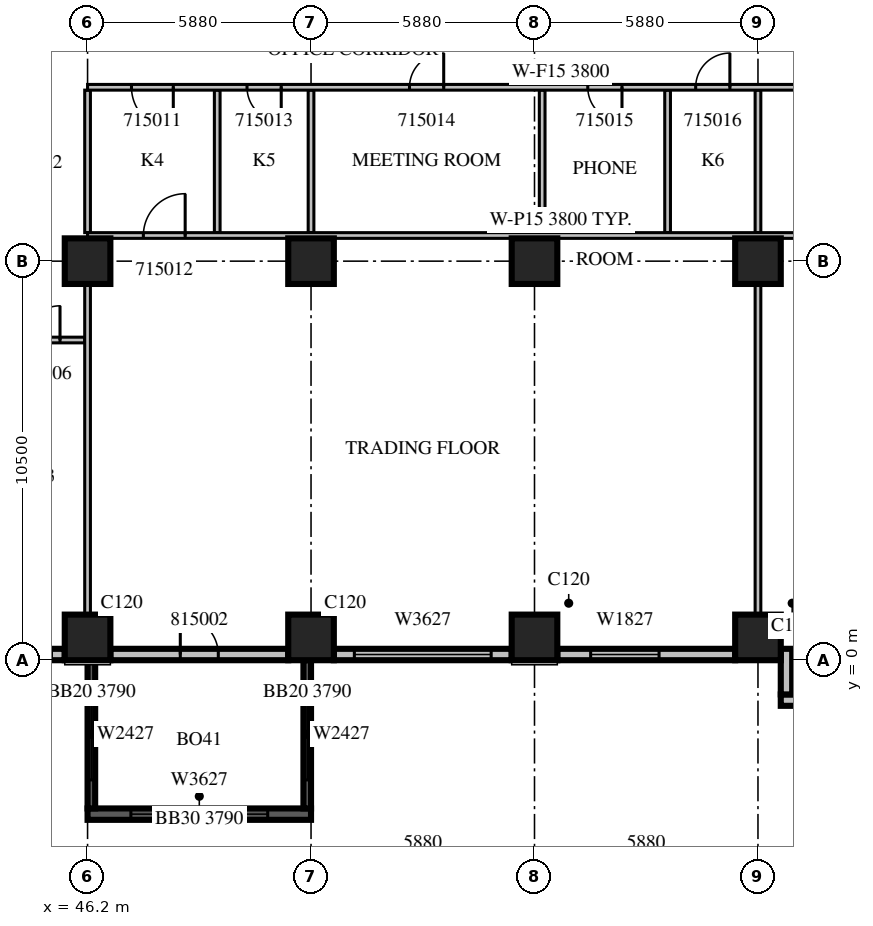
"""IFC4 building model, lengths in metres.
Left out: names, types, materials, properties, quantities, classifications, styles, units other than length and angle.
Written with IfcOpenShell. Run it as: python <this file> out.ifc"""

import sys

from ifc_helpers import new_model, si_unit, direction, frame, frame_2d, origin, origin_2d, place, context, subcontext, project, spatial, rectangle, extrude, source, transform, mapped, element, fill, save


model = new_model("IFC4")
c1 = context("Model", 3, precision=1e-05, world=origin(), true_north=direction((0.0, 1.0)))
c2 = subcontext(c1, "Body", "Model", "MODEL_VIEW")
j1 = project(units=[si_unit("LENGTHUNIT", "METRE"), si_unit("PLANEANGLEUNIT", "RADIAN")], contexts=[c1])
p1 = place(None, origin())
s1 = spatial("IfcSite", under=j1, at=p1, CompositionType="ELEMENT")
p2 = place(p1, origin())
s2 = spatial("IfcBuilding", under=s1, at=p2, CompositionType="ELEMENT")
p3 = place(p2, frame((0.0, 0.0, 74.1)))
s3 = spatial("IfcBuildingStorey", under=s2, at=p3, CompositionType="ELEMENT", Elevation=74.1)
m1 = source(origin(), c2, "Body", "SweptSolid", [
    extrude(rectangle(XDim=1.2, YDim=1.2, at=origin_2d()), origin(), (0.0, 0.0, 1.0), 4.2),
])
for number, where, z_axis, x_axis in (
    (1, (46.2, 0.6, 0.0), (0.0, 0.0, 1.0), (1.0, 0.0, 0.0)),
    (2, (52.08, 0.6, 0.0), (0.0, 0.0, 1.0), (1.0, 0.0, 0.0)),
    (3, (57.96, 0.6, 0.0), (0.0, 0.0, 1.0), (1.0, 0.0, 0.0)),
    (4, (63.84, 0.6, 0.0), (0.0, 0.0, 1.0), (1.0, 0.0, 0.0)),
    (5, (46.2, 10.5, 0.0), (0.0, 0.0, 1.0), (1.0, 0.0, 0.0)),
    (6, (52.08, 10.5, 0.0), (0.0, 0.0, 1.0), (1.0, 0.0, 0.0)),
    (7, (57.96, 10.5, 0.0), (0.0, 0.0, 1.0), (1.0, 0.0, 0.0)),
    (8, (63.84, 10.5, 0.0), (0.0, 0.0, 1.0), (1.0, 0.0, 0.0)),
):
    element("IfcColumn", number, at=place(p3, frame(where, z_axis=z_axis, x_axis=x_axis)), inside=s3, PredefinedType="COLUMN", context=c2, shape_type="MappedRepresentation", body=[
        mapped(m1, transform((0.0, 0.0, 0.0), scale=1.0)),
    ])
m2 = source(origin(), c2, "Body", "SweptSolid", [
    extrude(rectangle(XDim=1.6, YDim=0.3, at=frame_2d((0.8, 0.0))), origin(), (0.0, 0.0, 1.0), 3.8),
])
p4 = place(p3, frame((44.0, 0.15, 0.0), z_axis=(0.0, 0.0, 1.0), x_axis=(1.0, 0.0, 0.0)))
e9 = element("IfcWall", 9, at=p4, inside=s3, PredefinedType="STANDARD", context=c2, shape_type="MappedRepresentation", body=[
    mapped(m2, transform((0.0, 0.0, 0.0), scale=1.0)),
])
m3 = source(origin(), c2, "Body", "SweptSolid", [
    extrude(rectangle(XDim=0.9, YDim=2.7, at=frame_2d((0.45, 1.35))), frame((0.0, 0.16, 0.0), z_axis=(0.0, -1.0, 0.0), x_axis=(1.0, 0.0, 0.0)), (0.0, 0.0, 1.0), 0.32),
])
p5 = place(p4, frame((0.35, 0.0, 0.6)))
e10 = element("IfcOpeningElement", 10, at=p5, cuts=e9, PredefinedType="OPENING", context=c2, shape_type="MappedRepresentation", body=[
    mapped(m3, transform((0.0, 0.0, 0.0), scale=1.0)),
])
m4 = source(origin(), c2, "Body", "SweptSolid", [
    extrude(rectangle(XDim=4.68, YDim=0.3, at=frame_2d((2.34, 0.0))), origin(), (0.0, 0.0, 1.0), 3.8),
])
p6 = place(p3, frame((46.8, 0.15, 0.0), z_axis=(0.0, 0.0, 1.0), x_axis=(1.0, 0.0, 0.0)))
e11 = element("IfcWall", 11, at=p6, inside=s3, PredefinedType="STANDARD", context=c2, shape_type="MappedRepresentation", body=[
    mapped(m4, transform((0.0, 0.0, 0.0), scale=1.0)),
])
m5 = source(origin(), c2, "Body", "SweptSolid", [
    extrude(rectangle(XDim=1.0, YDim=2.1, at=frame_2d((0.5, 1.05))), frame((0.0, 0.16, 0.0), z_axis=(0.0, -1.0, 0.0), x_axis=(1.0, 0.0, 0.0)), (0.0, 0.0, 1.0), 0.32),
])
p7 = place(p6, frame((1.84, 0.0, 0.0)))
e12 = element("IfcOpeningElement", 12, at=p7, cuts=e11, PredefinedType="OPENING", context=c2, shape_type="MappedRepresentation", body=[
    mapped(m5, transform((0.0, 0.0, 0.0), scale=1.0)),
])
p8 = place(p3, frame((52.68, 0.15, 0.0), z_axis=(0.0, 0.0, 1.0), x_axis=(1.0, 0.0, 0.0)))
e13 = element("IfcWall", 13, at=p8, inside=s3, PredefinedType="STANDARD", context=c2, shape_type="MappedRepresentation", body=[
    mapped(m4, transform((0.0, 0.0, 0.0), scale=1.0)),
])
m6 = source(origin(), c2, "Body", "SweptSolid", [
    extrude(rectangle(XDim=3.6, YDim=2.7, at=frame_2d((1.8, 1.35))), frame((0.0, 0.16, 0.0), z_axis=(0.0, -1.0, 0.0), x_axis=(1.0, 0.0, 0.0)), (0.0, 0.0, 1.0), 0.32),
])
p9 = place(p8, frame((0.54, 0.0, 0.6)))
e14 = element("IfcOpeningElement", 14, at=p9, cuts=e13, PredefinedType="OPENING", context=c2, shape_type="MappedRepresentation", body=[
    mapped(m6, transform((0.0, 0.0, 0.0), scale=1.0)),
])
p10 = place(p3, frame((58.56, 0.15, 0.0), z_axis=(0.0, 0.0, 1.0), x_axis=(1.0, 0.0, 0.0)))
e15 = element("IfcWall", 15, at=p10, inside=s3, PredefinedType="STANDARD", context=c2, shape_type="MappedRepresentation", body=[
    mapped(m4, transform((0.0, 0.0, 0.0), scale=1.0)),
])
m7 = source(origin(), c2, "Body", "SweptSolid", [
    extrude(rectangle(XDim=1.8, YDim=2.7, at=frame_2d((0.9, 1.35))), frame((0.0, 0.16, 0.0), z_axis=(0.0, -1.0, 0.0), x_axis=(1.0, 0.0, 0.0)), (0.0, 0.0, 1.0), 0.32),
])
p11 = place(p10, frame((0.877, 0.0, 0.6)))
e16 = element("IfcOpeningElement", 16, at=p11, cuts=e15, PredefinedType="OPENING", context=c2, shape_type="MappedRepresentation", body=[
    mapped(m7, transform((0.0, 0.0, 0.0), scale=1.0)),
])
m8 = source(origin(), c2, "Body", "SweptSolid", [
    extrude(rectangle(XDim=2.76, YDim=0.3, at=frame_2d((1.38, 0.0))), origin(), (0.0, 0.0, 1.0), 3.8),
])
p12 = place(p3, frame((64.44, -1.05, 0.0), z_axis=(0.0, 0.0, 1.0), x_axis=(1.0, 0.0, 0.0)))
e17 = element("IfcWall", 17, at=p12, inside=s3, PredefinedType="STANDARD", context=c2, shape_type="MappedRepresentation", body=[
    mapped(m8, transform((0.0, 0.0, 0.0), scale=1.0)),
])
p13 = place(p12, frame((0.58, 0.0, 0.6)))
e18 = element("IfcOpeningElement", 18, at=p13, cuts=e17, PredefinedType="OPENING", context=c2, shape_type="MappedRepresentation", body=[
    mapped(m7, transform((0.0, 0.0, 0.0), scale=1.0)),
])
m9 = source(origin(), c2, "Body", "SweptSolid", [
    extrude(rectangle(XDim=1.2, YDim=0.3, at=frame_2d((0.6, 0.0))), origin(), (0.0, 0.0, 1.0), 3.8),
])
p14 = place(p3, frame((64.59, 0.3, 0.0), z_axis=(0.0, 0.0, 1.0), x_axis=(0.0, -1.0, 0.0)))
e19 = element("IfcWall", 19, at=p14, inside=s3, PredefinedType="STANDARD", context=c2, shape_type="MappedRepresentation", body=[
    mapped(m9, transform((0.0, 0.0, 0.0), scale=1.0)),
])
m10 = source(origin(), c2, "Body", "SweptSolid", [
    extrude(rectangle(XDim=5.88, YDim=0.3, at=frame_2d((2.94, 0.0))), origin(), (0.0, 0.0, 1.0), 3.79),
])
p15 = place(p3, frame((46.2, -4.05, 0.0), z_axis=(0.0, 0.0, 1.0), x_axis=(1.0, 0.0, 0.0)))
e20 = element("IfcWall", 20, at=p15, inside=s3, PredefinedType="SOLIDWALL", context=c2, shape_type="MappedRepresentation", body=[
    mapped(m10, transform((0.0, 0.0, 0.0), scale=1.0)),
])
p16 = place(p15, frame((1.14, 0.0, 0.6)))
e21 = element("IfcOpeningElement", 21, at=p16, cuts=e20, PredefinedType="OPENING", context=c2, shape_type="MappedRepresentation", body=[
    mapped(m6, transform((0.0, 0.0, 0.0), scale=1.0)),
])
m11 = source(origin(), c2, "Body", "SweptSolid", [
    extrude(rectangle(XDim=3.9, YDim=0.2, at=frame_2d((1.95, 0.0))), origin(), (0.0, 0.0, 1.0), 3.79),
])
p17 = place(p3, frame((46.3, 0.0, 0.0), z_axis=(0.0, 0.0, 1.0), x_axis=(0.0, -1.0, 0.0)))
e22 = element("IfcWall", 22, at=p17, inside=s3, PredefinedType="SOLIDWALL", context=c2, shape_type="MappedRepresentation", body=[
    mapped(m11, transform((0.0, 0.0, 0.0), scale=1.0)),
])
m12 = source(origin(), c2, "Body", "SweptSolid", [
    extrude(rectangle(XDim=2.4, YDim=2.7, at=frame_2d((1.2, 1.35))), frame((0.0, 0.11, 0.0), z_axis=(0.0, -1.0, 0.0), x_axis=(1.0, 0.0, 0.0)), (0.0, 0.0, 1.0), 0.22),
])
p18 = place(p17, frame((0.75, 0.0, 0.6)))
e23 = element("IfcOpeningElement", 23, at=p18, cuts=e22, PredefinedType="OPENING", context=c2, shape_type="MappedRepresentation", body=[
    mapped(m12, transform((0.0, 0.0, 0.0), scale=1.0)),
])
p19 = place(p3, frame((51.98, 0.0, 0.0), z_axis=(0.0, 0.0, 1.0), x_axis=(0.0, -1.0, 0.0)))
e24 = element("IfcWall", 24, at=p19, inside=s3, PredefinedType="SOLIDWALL", context=c2, shape_type="MappedRepresentation", body=[
    mapped(m11, transform((0.0, 0.0, 0.0), scale=1.0)),
])
p20 = place(p19, frame((0.75, 0.0, 0.6)))
e25 = element("IfcOpeningElement", 25, at=p20, cuts=e24, PredefinedType="OPENING", context=c2, shape_type="MappedRepresentation", body=[
    mapped(m12, transform((0.0, 0.0, 0.0), scale=1.0)),
])
m13 = source(origin(), c2, "Body", "SweptSolid", [
    extrude(rectangle(XDim=2.2, YDim=0.15, at=frame_2d((1.1, 0.0))), origin(), (0.0, 0.0, 1.0), 3.8),
])
p21 = place(p3, frame((46.125, 8.425, 0.0), z_axis=(0.0, 0.0, 1.0), x_axis=(-1.0, 0.0, 0.0)))
e26 = element("IfcWall", 26, at=p21, inside=s3, PredefinedType="PARTITIONING", context=c2, shape_type="MappedRepresentation", body=[
    mapped(m13, transform((0.0, 0.0, 0.0), scale=1.0)),
])
m14 = source(origin(), c2, "Body", "SweptSolid", [
    extrude(rectangle(XDim=0.9, YDim=2.1, at=frame_2d((0.45, 1.05))), frame((0.0, 0.085, 0.0), z_axis=(0.0, -1.0, 0.0), x_axis=(1.0, 0.0, 0.0)), (0.0, 0.0, 1.0), 0.17),
])
p22 = place(p21, frame((0.65, 0.0, 0.0)))
e27 = element("IfcOpeningElement", 27, at=p22, cuts=e26, PredefinedType="OPENING", context=c2, shape_type="MappedRepresentation", body=[
    mapped(m14, transform((0.0, 0.0, 0.0), scale=1.0)),
])
m15 = source(origin(), c2, "Body", "SweptSolid", [
    extrude(rectangle(XDim=3.75, YDim=0.15, at=frame_2d((1.875, 0.0))), origin(), (0.0, 0.0, 1.0), 3.8),
])
for number, where, z_axis, x_axis in (
    (28, (49.612, 11.25, 0.0), (0.0, 0.0, 1.0), (0.0, 1.0, 0.0)),
    (29, (52.08, 11.25, 0.0), (0.0, 0.0, 1.0), (0.0, 1.0, 0.0)),
    (30, (58.162, 11.25, 0.0), (0.0, 0.0, 1.0), (0.0, 1.0, 0.0)),
    (31, (61.462, 11.25, 0.0), (0.0, 0.0, 1.0), (0.0, 1.0, 0.0)),
):
    element("IfcWall", number, at=place(p3, frame(where, z_axis=z_axis, x_axis=x_axis)), inside=s3, PredefinedType="PARTITIONING", context=c2, shape_type="MappedRepresentation", body=[
        mapped(m15, transform((0.0, 0.0, 0.0), scale=1.0)),
    ])
m16 = source(origin(), c2, "Body", "SweptSolid", [
    extrude(rectangle(XDim=8.702, YDim=0.15, at=frame_2d((4.351, 0.0))), origin(), (0.0, 0.0, 1.0), 3.8),
])
p23 = place(p3, frame((46.2, 1.199, 0.0), z_axis=(0.0, 0.0, 1.0), x_axis=(0.0, 1.0, 0.0)))
e32 = element("IfcWall", 32, at=p23, inside=s3, PredefinedType="PARTITIONING", context=c2, shape_type="MappedRepresentation", body=[
    mapped(m16, transform((0.0, 0.0, 0.0), scale=1.0)),
])
p24 = place(p3, frame((46.2, 11.25, 0.0), z_axis=(0.0, 0.0, 1.0), x_axis=(0.0, 1.0, 0.0)))
e33 = element("IfcWall", 33, at=p24, inside=s3, PredefinedType="PARTITIONING", context=c2, shape_type="MappedRepresentation", body=[
    mapped(m15, transform((0.0, 0.0, 0.0), scale=1.0)),
])
p25 = place(p3, frame((63.84, 1.199, 0.0), z_axis=(0.0, 0.0, 1.0), x_axis=(0.0, 1.0, 0.0)))
e34 = element("IfcWall", 34, at=p25, inside=s3, PredefinedType="PARTITIONING", context=c2, shape_type="MappedRepresentation", body=[
    mapped(m16, transform((0.0, 0.0, 0.0), scale=1.0)),
])
p26 = place(p3, frame((63.84, 11.25, 0.0), z_axis=(0.0, 0.0, 1.0), x_axis=(0.0, 1.0, 0.0)))
e35 = element("IfcWall", 35, at=p26, inside=s3, PredefinedType="PARTITIONING", context=c2, shape_type="MappedRepresentation", body=[
    mapped(m15, transform((0.0, 0.0, 0.0), scale=1.0)),
])
m17 = source(origin(), c2, "Body", "SweptSolid", [
    extrude(rectangle(XDim=24.9, YDim=0.15, at=frame_2d((12.45, 0.0))), origin(), (0.0, 0.0, 1.0), 3.8),
])
p27 = place(p3, frame((71.1, 11.175, 0.0), z_axis=(0.0, 0.0, 1.0), x_axis=(-1.0, 0.0, 0.0)))
e36 = element("IfcWall", 36, at=p27, inside=s3, PredefinedType="PARTITIONING", context=c2, shape_type="MappedRepresentation", body=[
    mapped(m17, transform((0.0, 0.0, 0.0), scale=1.0)),
])
m18 = source(origin(), c2, "Body", "SweptSolid", [
    extrude(rectangle(XDim=1.1, YDim=2.1, at=frame_2d((0.55, 1.05))), frame((0.0, 0.085, 0.0), z_axis=(0.0, -1.0, 0.0), x_axis=(1.0, 0.0, 0.0)), (0.0, 0.0, 1.0), 0.17),
])
p28 = place(p27, frame((22.332, 0.0, 0.0)))
e37 = element("IfcOpeningElement", 37, at=p28, cuts=e36, PredefinedType="OPENING", context=c2, shape_type="MappedRepresentation", body=[
    mapped(m18, transform((0.0, 0.0, 0.0), scale=1.0)),
])
p29 = place(p27, frame((4.607, 0.0, 0.0)))
e38 = element("IfcOpeningElement", 38, at=p29, cuts=e36, PredefinedType="OPENING", context=c2, shape_type="MappedRepresentation", body=[
    mapped(m14, transform((0.0, 0.0, 0.0), scale=1.0)),
])
p30 = place(p27, frame((2.243, 0.0, 0.0)))
e39 = element("IfcOpeningElement", 39, at=p30, cuts=e36, PredefinedType="OPENING", context=c2, shape_type="MappedRepresentation", body=[
    mapped(m14, transform((0.0, 0.0, 0.0), scale=1.0)),
])
p31 = place(p3, frame((71.1, 15.075, 0.0), z_axis=(0.0, 0.0, 1.0), x_axis=(-1.0, 0.0, 0.0)))
e40 = element("IfcWall", 40, at=p31, inside=s3, PredefinedType="PARTITIONING", context=c2, shape_type="MappedRepresentation", body=[
    mapped(m17, transform((0.0, 0.0, 0.0), scale=1.0)),
])
p32 = place(p31, frame((22.644, 0.0, 0.0)))
e41 = element("IfcOpeningElement", 41, at=p32, cuts=e40, PredefinedType="OPENING", context=c2, shape_type="MappedRepresentation", body=[
    mapped(m18, transform((0.0, 0.0, 0.0), scale=1.0)),
])
p33 = place(p31, frame((19.804, 0.0, 0.0)))
e42 = element("IfcOpeningElement", 42, at=p33, cuts=e40, PredefinedType="OPENING", context=c2, shape_type="MappedRepresentation", body=[
    mapped(m14, transform((0.0, 0.0, 0.0), scale=1.0)),
])
p34 = place(p31, frame((15.529, 0.0, 0.0)))
e43 = element("IfcOpeningElement", 43, at=p34, cuts=e40, PredefinedType="OPENING", context=c2, shape_type="MappedRepresentation", body=[
    mapped(m14, transform((0.0, 0.0, 0.0), scale=1.0)),
])
p35 = place(p31, frame((10.838, 0.0, 0.0)))
e44 = element("IfcOpeningElement", 44, at=p35, cuts=e40, PredefinedType="OPENING", context=c2, shape_type="MappedRepresentation", body=[
    mapped(m14, transform((0.0, 0.0, 0.0), scale=1.0)),
])
p36 = place(p31, frame((7.999, 0.0, 0.0)))
e45 = element("IfcOpeningElement", 45, at=p36, cuts=e40, PredefinedType="OPENING", context=c2, shape_type="MappedRepresentation", body=[
    mapped(m14, transform((0.0, 0.0, 0.0), scale=1.0)),
])
m19 = source(origin(), c2, "Body", "SweptSolid", [
    extrude(rectangle(XDim=1.2, YDim=2.1, at=frame_2d((0.6, 1.05))), frame((0.0, 0.085, 0.0), z_axis=(0.0, -1.0, 0.0), x_axis=(1.0, 0.0, 0.0)), (0.0, 0.0, 1.0), 0.17),
])
p37 = place(p31, frame((2.993, 0.0, 0.0)))
e46 = element("IfcOpeningElement", 46, at=p37, cuts=e40, PredefinedType="OPENING", context=c2, shape_type="MappedRepresentation", body=[
    mapped(m19, transform((0.0, 0.0, 0.0), scale=1.0)),
])
m20 = source(origin(), c2, "Body", "SweptSolid", [
    extrude(rectangle(XDim=3.6, YDim=2.7, at=frame_2d((1.8, 1.35))), frame((0.0, 0.03, 0.0), z_axis=(0.0, -1.0, 0.0), x_axis=(1.0, 0.0, 0.0)), (0.0, 0.0, 1.0), 0.06),
])
p38 = place(p9, origin())
e47 = element("IfcWindow", 47, at=p38, inside=s3, PartitioningType="SINGLE_PANEL", PredefinedType="WINDOW", context=c2, shape_type="MappedRepresentation", body=[
    mapped(m20, transform((0.0, 0.0, 0.0), scale=1.0)),
])
fill(e14, e47)
m21 = source(origin(), c2, "Body", "SweptSolid", [
    extrude(rectangle(XDim=1.8, YDim=2.7, at=frame_2d((0.9, 1.35))), frame((0.0, 0.03, 0.0), z_axis=(0.0, -1.0, 0.0), x_axis=(1.0, 0.0, 0.0)), (0.0, 0.0, 1.0), 0.06),
])
p39 = place(p11, origin())
e48 = element("IfcWindow", 48, at=p39, inside=s3, PartitioningType="SINGLE_PANEL", PredefinedType="WINDOW", context=c2, shape_type="MappedRepresentation", body=[
    mapped(m21, transform((0.0, 0.0, 0.0), scale=1.0)),
])
fill(e16, e48)
p40 = place(p16, origin())
e49 = element("IfcWindow", 49, at=p40, inside=s3, PartitioningType="SINGLE_PANEL", PredefinedType="WINDOW", context=c2, shape_type="MappedRepresentation", body=[
    mapped(m20, transform((0.0, 0.0, 0.0), scale=1.0)),
])
fill(e21, e49)
m22 = source(origin(), c2, "Body", "SweptSolid", [
    extrude(rectangle(XDim=2.4, YDim=2.7, at=frame_2d((1.2, 1.35))), frame((0.0, 0.03, 0.0), z_axis=(0.0, -1.0, 0.0), x_axis=(1.0, 0.0, 0.0)), (0.0, 0.0, 1.0), 0.06),
])
p41 = place(p18, origin())
e50 = element("IfcWindow", 50, at=p41, inside=s3, PartitioningType="SINGLE_PANEL", PredefinedType="WINDOW", context=c2, shape_type="MappedRepresentation", body=[
    mapped(m22, transform((0.0, 0.0, 0.0), scale=1.0)),
])
fill(e23, e50)
p42 = place(p20, origin())
e51 = element("IfcWindow", 51, at=p42, inside=s3, PartitioningType="SINGLE_PANEL", PredefinedType="WINDOW", context=c2, shape_type="MappedRepresentation", body=[
    mapped(m22, transform((0.0, 0.0, 0.0), scale=1.0)),
])
fill(e25, e51)
m23 = source(origin(), c2, "Body", "SweptSolid", [
    extrude(rectangle(XDim=0.9, YDim=2.1, at=frame_2d((0.45, 1.05))), frame((0.0, 0.025, 0.0), z_axis=(0.0, -1.0, 0.0), x_axis=(1.0, 0.0, 0.0)), (0.0, 0.0, 1.0), 0.05),
])
p43 = place(p22, origin())
e52 = element("IfcDoor", 52, at=p43, inside=s3, OperationType="SINGLE_SWING_RIGHT", PredefinedType="DOOR", context=c2, shape_type="MappedRepresentation", body=[
    mapped(m23, transform((0.0, 0.0, 0.0), scale=1.0)),
])
fill(e27, e52)
m24 = source(origin(), c2, "Body", "SweptSolid", [
    extrude(rectangle(XDim=1.1, YDim=2.1, at=frame_2d((0.55, 1.05))), frame((0.0, 0.025, 0.0), z_axis=(0.0, -1.0, 0.0), x_axis=(1.0, 0.0, 0.0)), (0.0, 0.0, 1.0), 0.05),
])
p44 = place(p32, origin())
e53 = element("IfcDoor", 53, at=p44, inside=s3, OperationType="SINGLE_SWING_LEFT", PredefinedType="DOOR", context=c2, shape_type="MappedRepresentation", body=[
    mapped(m24, transform((0.0, 0.0, 0.0), scale=1.0)),
])
fill(e41, e53)
p45 = place(p28, origin())
e54 = element("IfcDoor", 54, at=p45, inside=s3, OperationType="SINGLE_SWING_RIGHT", PredefinedType="DOOR", context=c2, shape_type="MappedRepresentation", body=[
    mapped(m24, transform((0.0, 0.0, 0.0), scale=1.0)),
])
fill(e37, e54)
p46 = place(p33, origin())
e55 = element("IfcDoor", 55, at=p46, inside=s3, OperationType="SINGLE_SWING_LEFT", PredefinedType="DOOR", context=c2, shape_type="MappedRepresentation", body=[
    mapped(m23, transform((0.0, 0.0, 0.0), scale=1.0)),
])
fill(e42, e55)
p47 = place(p34, origin())
e56 = element("IfcDoor", 56, at=p47, inside=s3, OperationType="SINGLE_SWING_RIGHT", PredefinedType="DOOR", context=c2, shape_type="MappedRepresentation", body=[
    mapped(m23, transform((0.0, 0.0, 0.0), scale=1.0)),
])
fill(e43, e56)
p48 = place(p35, origin())
e57 = element("IfcDoor", 57, at=p48, inside=s3, OperationType="SINGLE_SWING_LEFT", PredefinedType="DOOR", context=c2, shape_type="MappedRepresentation", body=[
    mapped(m23, transform((0.0, 0.0, 0.0), scale=1.0)),
])
fill(e44, e57)
p49 = place(p36, origin())
e58 = element("IfcDoor", 58, at=p49, inside=s3, OperationType="SINGLE_SWING_RIGHT", PredefinedType="DOOR", context=c2, shape_type="MappedRepresentation", body=[
    mapped(m23, transform((0.0, 0.0, 0.0), scale=1.0)),
])
fill(e45, e58)
m25 = source(origin(), c2, "Body", "SweptSolid", [
    extrude(rectangle(XDim=1.0, YDim=2.1, at=frame_2d((0.5, 1.05))), frame((0.0, 0.025, 0.0), z_axis=(0.0, -1.0, 0.0), x_axis=(1.0, 0.0, 0.0)), (0.0, 0.0, 1.0), 0.05),
])
p50 = place(p7, origin())
e59 = element("IfcDoor", 59, at=p50, inside=s3, OperationType="SINGLE_SWING_LEFT", PredefinedType="DOOR", context=c2, shape_type="MappedRepresentation", body=[
    mapped(m25, transform((0.0, 0.0, 0.0), scale=1.0)),
])
fill(e12, e59)
save(model, sys.argv[1])
